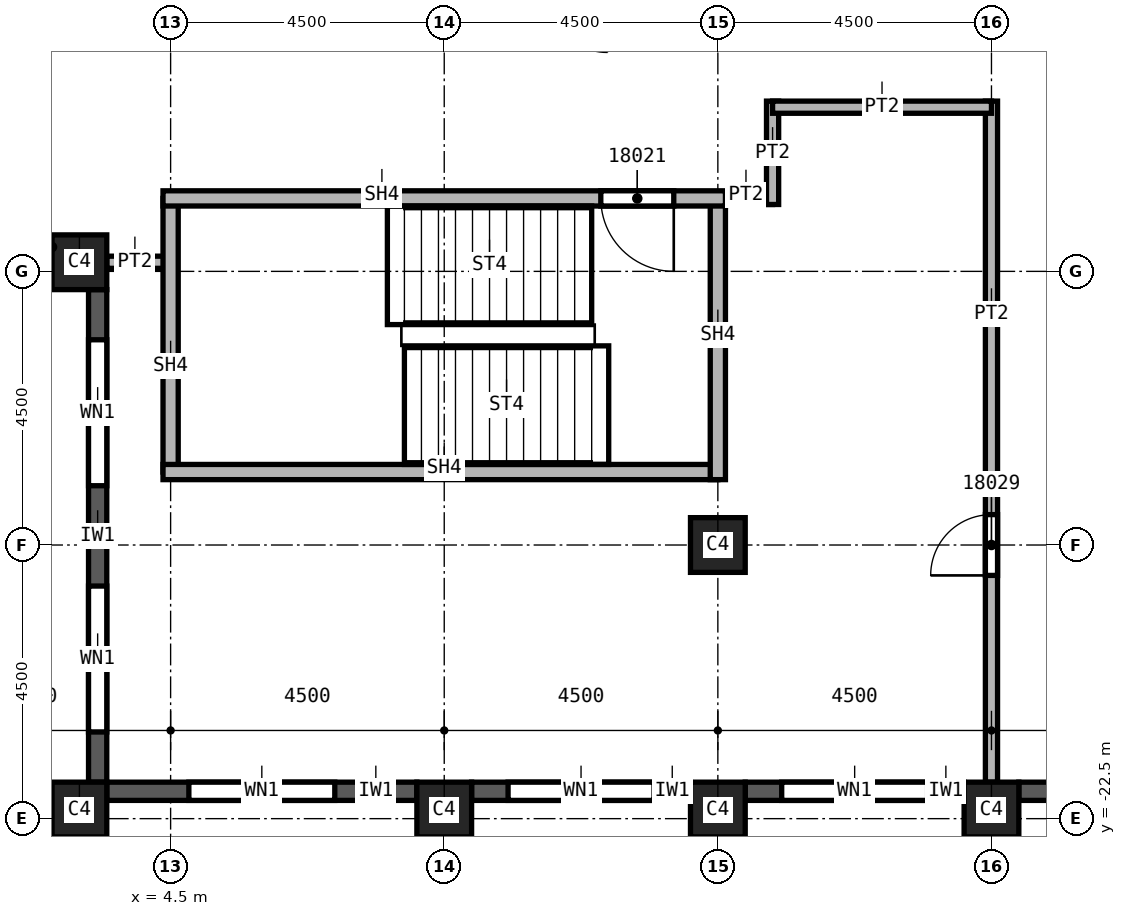
"""IFC4 building model, lengths in metres.
Left out: names, types, materials, properties, quantities, classifications, styles, units other than length and angle.
Written with IfcOpenShell. Run it as: python <this file> out.ifc"""

import sys

from ifc_helpers import new_model, si_unit, direction, frame, frame_2d, origin, origin_2d, place, context, subcontext, project, spatial, rectangle, extrude, element, fill, save


model = new_model("IFC4")
c1 = context("Model", 3, precision=1e-05, world=origin(), true_north=direction((0.0, 1.0)))
c2 = subcontext(c1, "Body", "Model", "MODEL_VIEW")
j1 = project(units=[si_unit("LENGTHUNIT", "METRE"), si_unit("PLANEANGLEUNIT", "RADIAN")], contexts=[c1])
p1 = place(None, origin())
s1 = spatial("IfcSite", under=j1, at=p1, CompositionType="ELEMENT")
p2 = place(p1, origin())
s2 = spatial("IfcBuilding", under=s1, at=p2, CompositionType="ELEMENT")
p3 = place(p2, frame((0.0, 0.0, 266.0)))
s3 = spatial("IfcBuildingStorey", under=s2, at=p3, CompositionType="ELEMENT", Elevation=266.0)
for number, where, z_axis, x_axis in (
    (1, (13.5, -18.0, 0.0), (0.0, 0.0, 1.0), (1.0, 0.0, 0.0)),
    (2, (3.0, -22.35, 0.0), (0.0, 0.0, 1.0), (1.0, 0.0, 0.0)),
    (3, (9.0, -22.35, 0.0), (0.0, 0.0, 1.0), (1.0, 0.0, 0.0)),
    (4, (13.5, -22.35, 0.0), (0.0, 0.0, 1.0), (1.0, 0.0, 0.0)),
    (5, (18.0, -22.35, 0.0), (0.0, 0.0, 1.0), (1.0, 0.0, 0.0)),
    (6, (3.0, -13.35, 0.0), (0.0, 0.0, 1.0), (1.0, 0.0, 0.0)),
):
    element("IfcColumn", number, at=place(p3, frame(where, z_axis=z_axis, x_axis=x_axis)), inside=s3, PredefinedType="COLUMN", context=c2, shape_type="SweptSolid", body=[
        extrude(rectangle(XDim=0.9, YDim=0.9, at=origin_2d()), origin(), (0.0, 0.0, 1.0), 3.72),
    ])
p4 = place(p3, frame((3.3, -13.8, 0.0), z_axis=(0.0, 0.0, 1.0), x_axis=(0.0, -1.0, 0.0)))
e7 = element("IfcWall", 7, at=p4, inside=s3, PredefinedType="SOLIDWALL", context=c2, shape_type="SweptSolid", body=[
    extrude(rectangle(XDim=8.1, YDim=0.3, at=frame_2d((4.05, 0.0))), origin(), (0.0, 0.0, 1.0), 3.12),
])
p5 = place(p4, frame((0.825, 0.0, 0.8)))
e8 = element("IfcOpeningElement", 8, at=p5, cuts=e7, PredefinedType="OPENING", context=c2, shape_type="SweptSolid", body=[
    extrude(rectangle(XDim=2.4, YDim=1.95, at=frame_2d((1.2, 0.975))), frame((0.0, 0.15, 0.0), z_axis=(0.0, -1.0, 0.0), x_axis=(1.0, 0.0, 0.0)), (0.0, 0.0, 1.0), 0.3),
])
p6 = place(p4, frame((4.875, 0.0, 0.8)))
e9 = element("IfcOpeningElement", 9, at=p6, cuts=e7, PredefinedType="OPENING", context=c2, shape_type="SweptSolid", body=[
    extrude(rectangle(XDim=2.4, YDim=1.95, at=frame_2d((1.2, 0.975))), frame((0.0, 0.15, 0.0), z_axis=(0.0, -1.0, 0.0), x_axis=(1.0, 0.0, 0.0)), (0.0, 0.0, 1.0), 0.3),
])
p7 = place(p3, frame((3.45, -22.05, 0.0), z_axis=(0.0, 0.0, 1.0), x_axis=(1.0, 0.0, 0.0)))
e10 = element("IfcWall", 10, at=p7, inside=s3, PredefinedType="SOLIDWALL", context=c2, shape_type="SweptSolid", body=[
    extrude(rectangle(XDim=5.1, YDim=0.3, at=frame_2d((2.55, 0.0))), origin(), (0.0, 0.0, 1.0), 3.12),
])
p8 = place(p7, frame((1.35, 0.0, 0.8)))
e11 = element("IfcOpeningElement", 11, at=p8, cuts=e10, PredefinedType="OPENING", context=c2, shape_type="SweptSolid", body=[
    extrude(rectangle(XDim=2.4, YDim=1.95, at=frame_2d((1.2, 0.975))), frame((0.0, 0.15, 0.0), z_axis=(0.0, -1.0, 0.0), x_axis=(1.0, 0.0, 0.0)), (0.0, 0.0, 1.0), 0.3),
])
p9 = place(p3, frame((9.45, -22.05, 0.0), z_axis=(0.0, 0.0, 1.0), x_axis=(1.0, 0.0, 0.0)))
e12 = element("IfcWall", 12, at=p9, inside=s3, PredefinedType="SOLIDWALL", context=c2, shape_type="SweptSolid", body=[
    extrude(rectangle(XDim=3.6, YDim=0.3, at=frame_2d((1.8, 0.0))), origin(), (0.0, 0.0, 1.0), 3.12),
])
p10 = place(p9, frame((0.6, 0.0, 0.8)))
e13 = element("IfcOpeningElement", 13, at=p10, cuts=e12, PredefinedType="OPENING", context=c2, shape_type="SweptSolid", body=[
    extrude(rectangle(XDim=2.4, YDim=1.95, at=frame_2d((1.2, 0.975))), frame((0.0, 0.15, 0.0), z_axis=(0.0, -1.0, 0.0), x_axis=(1.0, 0.0, 0.0)), (0.0, 0.0, 1.0), 0.3),
])
p11 = place(p3, frame((13.95, -22.05, 0.0), z_axis=(0.0, 0.0, 1.0), x_axis=(1.0, 0.0, 0.0)))
e14 = element("IfcWall", 14, at=p11, inside=s3, PredefinedType="SOLIDWALL", context=c2, shape_type="SweptSolid", body=[
    extrude(rectangle(XDim=3.6, YDim=0.3, at=frame_2d((1.8, 0.0))), origin(), (0.0, 0.0, 1.0), 3.12),
])
p12 = place(p11, frame((0.6, 0.0, 0.8)))
e15 = element("IfcOpeningElement", 15, at=p12, cuts=e14, PredefinedType="OPENING", context=c2, shape_type="SweptSolid", body=[
    extrude(rectangle(XDim=2.4, YDim=1.95, at=frame_2d((1.2, 0.975))), frame((0.0, 0.15, 0.0), z_axis=(0.0, -1.0, 0.0), x_axis=(1.0, 0.0, 0.0)), (0.0, 0.0, 1.0), 0.3),
])
p13 = place(p3, frame((18.45, -22.05, 0.0), z_axis=(0.0, 0.0, 1.0), x_axis=(1.0, 0.0, 0.0)))
e16 = element("IfcWall", 16, at=p13, inside=s3, PredefinedType="SOLIDWALL", context=c2, shape_type="SweptSolid", body=[
    extrude(rectangle(XDim=3.6, YDim=0.3, at=frame_2d((1.8, 0.0))), origin(), (0.0, 0.0, 1.0), 3.12),
])
p14 = place(p13, frame((0.625, 0.0, 0.8)))
e17 = element("IfcOpeningElement", 17, at=p14, cuts=e16, PredefinedType="OPENING", context=c2, shape_type="SweptSolid", body=[
    extrude(rectangle(XDim=0.6, YDim=1.95, at=frame_2d((0.3, 0.975))), frame((0.0, 0.15, 0.0), z_axis=(0.0, -1.0, 0.0), x_axis=(1.0, 0.0, 0.0)), (0.0, 0.0, 1.0), 0.3),
])
p15 = place(p13, frame((1.825, 0.0, 0.8)))
e18 = element("IfcOpeningElement", 18, at=p15, cuts=e16, PredefinedType="OPENING", context=c2, shape_type="SweptSolid", body=[
    extrude(rectangle(XDim=1.0, YDim=1.95, at=frame_2d((0.5, 0.975))), frame((0.0, 0.15, 0.0), z_axis=(0.0, -1.0, 0.0), x_axis=(1.0, 0.0, 0.0)), (0.0, 0.0, 1.0), 0.3),
])
p16 = place(p3, frame((4.5, -13.35, 0.0), z_axis=(0.0, 0.0, 1.0), x_axis=(-1.0, 0.0, 0.0)))
e19 = element("IfcWall", 19, at=p16, inside=s3, PredefinedType="PARTITIONING", context=c2, shape_type="SweptSolid", body=[
    extrude(rectangle(XDim=1.05, YDim=0.2, at=frame_2d((0.525, 0.0))), origin(), (0.0, 0.0, 1.0), 3.72),
])
p17 = place(p3, frame((14.4, -12.3, 0.0), z_axis=(0.0, 0.0, 1.0), x_axis=(-1.0, 0.0, 0.0)))
e20 = element("IfcWall", 20, at=p17, inside=s3, PredefinedType="PARTITIONING", context=c2, shape_type="SweptSolid", body=[
    extrude(rectangle(XDim=1.025, YDim=0.2, at=frame_2d((0.512, 0.0))), origin(), (0.0, 0.0, 1.0), 3.72),
])
p18 = place(p3, frame((14.4, -10.7, 0.0), z_axis=(0.0, 0.0, 1.0), x_axis=(0.0, -1.0, 0.0)))
e21 = element("IfcWall", 21, at=p18, inside=s3, PredefinedType="PARTITIONING", context=c2, shape_type="SweptSolid", body=[
    extrude(rectangle(XDim=1.7, YDim=0.2, at=frame_2d((0.85, 0.0))), origin(), (0.0, 0.0, 1.0), 3.72),
])
p19 = place(p3, frame((18.0, -21.9, 0.0), z_axis=(0.0, 0.0, 1.0), x_axis=(0.0, 1.0, 0.0)))
e22 = element("IfcWall", 22, at=p19, inside=s3, PredefinedType="PARTITIONING", context=c2, shape_type="SweptSolid", body=[
    extrude(rectangle(XDim=11.2, YDim=0.2, at=frame_2d((5.6, 0.0))), origin(), (0.0, 0.0, 1.0), 3.72),
])
p20 = place(p19, frame((3.4, 0.0, 0.0)))
e23 = element("IfcOpeningElement", 23, at=p20, cuts=e22, PredefinedType="OPENING", context=c2, shape_type="SweptSolid", body=[
    extrude(rectangle(XDim=1.0, YDim=2.1, at=frame_2d((0.5, 1.05))), frame((0.0, 0.1, 0.0), z_axis=(0.0, -1.0, 0.0), x_axis=(1.0, 0.0, 0.0)), (0.0, 0.0, 1.0), 0.2),
])
p21 = place(p3, frame((18.0, -10.8, 0.0), z_axis=(0.0, 0.0, 1.0), x_axis=(-1.0, 0.0, 0.0)))
e24 = element("IfcWall", 24, at=p21, inside=s3, PredefinedType="PARTITIONING", context=c2, shape_type="SweptSolid", body=[
    extrude(rectangle(XDim=3.6, YDim=0.2, at=frame_2d((1.8, 0.0))), origin(), (0.0, 0.0, 1.0), 3.72),
])
p22 = place(p3, frame((4.5, -16.8, 0.0), z_axis=(0.0, 0.0, 1.0), x_axis=(0.0, 1.0, 0.0)))
e25 = element("IfcWall", 25, at=p22, inside=s3, PredefinedType="SOLIDWALL", context=c2, shape_type="SweptSolid", body=[
    extrude(rectangle(XDim=4.5, YDim=0.25, at=frame_2d((2.25, 0.0))), origin(), (0.0, 0.0, 1.0), 3.72),
])
p23 = place(p3, frame((13.5, -16.8, 0.0), z_axis=(0.0, 0.0, 1.0), x_axis=(-1.0, 0.0, 0.0)))
e26 = element("IfcWall", 26, at=p23, inside=s3, PredefinedType="SOLIDWALL", context=c2, shape_type="SweptSolid", body=[
    extrude(rectangle(XDim=9.125, YDim=0.25, at=frame_2d((4.562, 0.0))), origin(), (0.0, 0.0, 1.0), 3.72),
])
p24 = place(p3, frame((13.5, -12.3, 0.0), z_axis=(0.0, 0.0, 1.0), x_axis=(0.0, -1.0, 0.0)))
e27 = element("IfcWall", 27, at=p24, inside=s3, PredefinedType="SOLIDWALL", context=c2, shape_type="SweptSolid", body=[
    extrude(rectangle(XDim=4.625, YDim=0.25, at=frame_2d((2.312, 0.0))), origin(), (0.0, 0.0, 1.0), 3.72),
])
p25 = place(p3, frame((13.625, -12.3, 0.0), z_axis=(0.0, 0.0, 1.0), x_axis=(-1.0, 0.0, 0.0)))
e28 = element("IfcWall", 28, at=p25, inside=s3, PredefinedType="SOLIDWALL", context=c2, shape_type="SweptSolid", body=[
    extrude(rectangle(XDim=9.25, YDim=0.25, at=frame_2d((4.625, 0.0))), origin(), (0.0, 0.0, 1.0), 3.72),
])
p26 = place(p25, frame((0.85, 0.0, 0.0)))
e29 = element("IfcOpeningElement", 29, at=p26, cuts=e28, PredefinedType="OPENING", context=c2, shape_type="SweptSolid", body=[
    extrude(rectangle(XDim=1.2, YDim=2.1, at=frame_2d((0.6, 1.05))), frame((0.0, 0.125, 0.0), z_axis=(0.0, -1.0, 0.0), x_axis=(1.0, 0.0, 0.0)), (0.0, 0.0, 1.0), 0.25),
])
p27 = place(p5, origin())
e30 = element("IfcWindow", 30, at=p27, inside=s3, PartitioningType="SINGLE_PANEL", PredefinedType="WINDOW", context=c2, shape_type="SweptSolid", body=[
    extrude(rectangle(XDim=2.4, YDim=1.95, at=frame_2d((1.2, 0.975))), frame((0.0, 0.03, 0.0), z_axis=(0.0, -1.0, 0.0), x_axis=(1.0, 0.0, 0.0)), (0.0, 0.0, 1.0), 0.06),
])
fill(e8, e30)
p28 = place(p6, origin())
e31 = element("IfcWindow", 31, at=p28, inside=s3, PartitioningType="SINGLE_PANEL", PredefinedType="WINDOW", context=c2, shape_type="SweptSolid", body=[
    extrude(rectangle(XDim=2.4, YDim=1.95, at=frame_2d((1.2, 0.975))), frame((0.0, 0.03, 0.0), z_axis=(0.0, -1.0, 0.0), x_axis=(1.0, 0.0, 0.0)), (0.0, 0.0, 1.0), 0.06),
])
fill(e9, e31)
p29 = place(p8, origin())
e32 = element("IfcWindow", 32, at=p29, inside=s3, PartitioningType="SINGLE_PANEL", PredefinedType="WINDOW", context=c2, shape_type="SweptSolid", body=[
    extrude(rectangle(XDim=2.4, YDim=1.95, at=frame_2d((1.2, 0.975))), frame((0.0, 0.03, 0.0), z_axis=(0.0, -1.0, 0.0), x_axis=(1.0, 0.0, 0.0)), (0.0, 0.0, 1.0), 0.06),
])
fill(e11, e32)
p30 = place(p10, origin())
e33 = element("IfcWindow", 33, at=p30, inside=s3, PartitioningType="SINGLE_PANEL", PredefinedType="WINDOW", context=c2, shape_type="SweptSolid", body=[
    extrude(rectangle(XDim=2.4, YDim=1.95, at=frame_2d((1.2, 0.975))), frame((0.0, 0.03, 0.0), z_axis=(0.0, -1.0, 0.0), x_axis=(1.0, 0.0, 0.0)), (0.0, 0.0, 1.0), 0.06),
])
fill(e13, e33)
p31 = place(p12, origin())
e34 = element("IfcWindow", 34, at=p31, inside=s3, PartitioningType="SINGLE_PANEL", PredefinedType="WINDOW", context=c2, shape_type="SweptSolid", body=[
    extrude(rectangle(XDim=2.4, YDim=1.95, at=frame_2d((1.2, 0.975))), frame((0.0, 0.03, 0.0), z_axis=(0.0, -1.0, 0.0), x_axis=(1.0, 0.0, 0.0)), (0.0, 0.0, 1.0), 0.06),
])
fill(e15, e34)
p32 = place(p26, origin())
e35 = element("IfcDoor", 35, at=p32, inside=s3, OperationType="SINGLE_SWING_RIGHT", PredefinedType="DOOR", context=c2, shape_type="SweptSolid", body=[
    extrude(rectangle(XDim=1.2, YDim=2.1, at=frame_2d((0.6, 1.05))), frame((0.0, 0.025, 0.0), z_axis=(0.0, -1.0, 0.0), x_axis=(1.0, 0.0, 0.0)), (0.0, 0.0, 1.0), 0.05),
])
fill(e29, e35)
p33 = place(p20, origin())
e36 = element("IfcDoor", 36, at=p33, inside=s3, OperationType="SINGLE_SWING_RIGHT", PredefinedType="DOOR", context=c2, shape_type="SweptSolid", body=[
    extrude(rectangle(XDim=1.0, YDim=2.1, at=frame_2d((0.5, 1.05))), frame((0.0, 0.025, 0.0), z_axis=(0.0, -1.0, 0.0), x_axis=(1.0, 0.0, 0.0)), (0.0, 0.0, 1.0), 0.05),
])
fill(e23, e36)
save(model, sys.argv[1])
